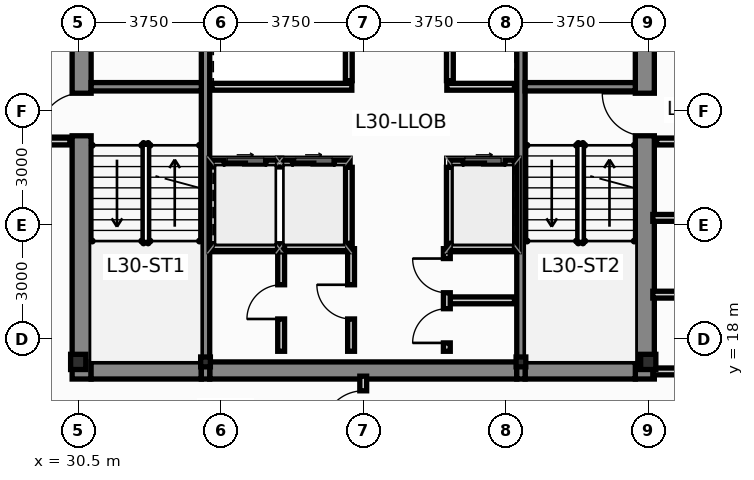
"""IFC4 building model, lengths in metres.
Left out: names, types, materials, properties, quantities, classifications, styles, units other than length and angle.
Written with IfcOpenShell. Run it as: python <this file> out.ifc"""

import sys

from ifc_helpers import new_model, si_unit, direction, frame, frame_2d, origin, origin_2d, place, context, subcontext, project, spatial, rectangle, i_section, extrude, source, transform, mapped, element, fill, save


model = new_model("IFC4")
c1 = context("Model", 3, precision=1e-05, world=origin(), true_north=direction((0.0, 1.0)))
c2 = subcontext(c1, "Body", "Model", "MODEL_VIEW")
j1 = project(units=[si_unit("LENGTHUNIT", "METRE"), si_unit("PLANEANGLEUNIT", "RADIAN")], contexts=[c1])
p1 = place(None, origin())
s1 = spatial("IfcSite", under=j1, at=p1, CompositionType="ELEMENT")
p2 = place(p1, origin())
s2 = spatial("IfcBuilding", under=s1, at=p2, CompositionType="ELEMENT")
p3 = place(p2, frame((0.0, 0.0, 116.35)))
s3 = spatial("IfcBuildingStorey", under=s2, at=p3, CompositionType="ELEMENT", Elevation=116.35)
m1 = source(origin(), c2, "Body", "SweptSolid", [
    extrude(i_section(OverallWidth=0.4, OverallDepth=0.4, WebThickness=0.02, FlangeThickness=0.032, at=origin_2d()), origin(), (0.0, 0.0, 1.0), 3.65),
])
for number, where, z_axis, x_axis in (
    (1, (30.5, 17.4, 0.0), (0.0, 0.0, 1.0), (1.0, 0.0, 0.0)),
    (2, (45.5, 17.4, 0.0), (0.0, 0.0, 1.0), (1.0, 0.0, 0.0)),
):
    element("IfcColumn", number, at=place(p3, frame(where, z_axis=z_axis, x_axis=x_axis)), inside=s3, PredefinedType="COLUMN", context=c2, shape_type="MappedRepresentation", body=[
        mapped(m1, transform((0.0, 0.0, 0.0), scale=1.0)),
    ])
m2 = source(origin(), c2, "Body", "SweptSolid", [
    extrude(i_section(OverallWidth=0.256, OverallDepth=0.26, WebThickness=0.01, FlangeThickness=0.017, at=origin_2d()), origin(), (0.0, 0.0, 1.0), 3.65),
])
for number, where, z_axis, x_axis in (
    (3, (33.85, 17.4, 0.0), (0.0, 0.0, 1.0), (1.0, 0.0, 0.0)),
    (4, (42.15, 17.4, 0.0), (0.0, 0.0, 1.0), (1.0, 0.0, 0.0)),
):
    element("IfcColumn", number, at=place(p3, frame(where, z_axis=z_axis, x_axis=x_axis)), inside=s3, PredefinedType="COLUMN", context=c2, shape_type="MappedRepresentation", body=[
        mapped(m2, transform((0.0, 0.0, 0.0), scale=1.0)),
    ])
p4 = place(p3, frame((30.59, 16.95, 0.0), z_axis=(0.0, 0.0, 1.0), x_axis=(0.0, 1.0, 0.0)))
e5 = element("IfcWall", 5, at=p4, inside=s3, PredefinedType="SHEAR", context=c2, shape_type="SweptSolid", body=[
    extrude(rectangle(XDim=13.275, YDim=0.5, at=frame_2d((6.638, 0.0))), origin(), (0.0, 0.0, 1.0), 3.65),
])
p5 = place(p4, frame((6.4, 0.0, 0.0)))
e6 = element("IfcOpeningElement", 6, at=p5, cuts=e5, PredefinedType="OPENING", context=c2, shape_type="SweptSolid", body=[
    extrude(rectangle(XDim=1.12, YDim=2.15, at=frame_2d((0.56, 1.075))), frame((0.0, 0.262, 0.0), z_axis=(0.0, -1.0, 0.0), x_axis=(1.0, 0.0, 0.0)), (0.0, 0.0, 1.0), 0.524),
])
p6 = place(p4, frame((10.85, 0.0, 0.0)))
e7 = element("IfcOpeningElement", 7, at=p6, cuts=e5, PredefinedType="OPENING", context=c2, shape_type="SweptSolid", body=[
    extrude(rectangle(XDim=1.2, YDim=2.2, at=frame_2d((0.6, 1.1))), frame((0.0, 0.262, 0.0), z_axis=(0.0, -1.0, 0.0), x_axis=(1.0, 0.0, 0.0)), (0.0, 0.0, 1.0), 0.524),
])
p7 = place(p3, frame((45.41, 16.95, 0.0), z_axis=(0.0, 0.0, 1.0), x_axis=(0.0, 1.0, 0.0)))
e8 = element("IfcWall", 8, at=p7, inside=s3, PredefinedType="SHEAR", context=c2, shape_type="SweptSolid", body=[
    extrude(rectangle(XDim=13.275, YDim=0.5, at=frame_2d((6.638, 0.0))), origin(), (0.0, 0.0, 1.0), 3.65),
])
p8 = place(p7, frame((6.4, 0.0, 0.0)))
e9 = element("IfcOpeningElement", 9, at=p8, cuts=e8, PredefinedType="OPENING", context=c2, shape_type="SweptSolid", body=[
    extrude(rectangle(XDim=1.12, YDim=2.15, at=frame_2d((0.56, 1.075))), frame((0.0, 0.262, 0.0), z_axis=(0.0, -1.0, 0.0), x_axis=(1.0, 0.0, 0.0)), (0.0, 0.0, 1.0), 0.524),
])
p9 = place(p7, frame((10.85, 0.0, 0.0)))
e10 = element("IfcOpeningElement", 10, at=p9, cuts=e8, PredefinedType="OPENING", context=c2, shape_type="SweptSolid", body=[
    extrude(rectangle(XDim=1.2, YDim=2.2, at=frame_2d((0.6, 1.1))), frame((0.0, 0.262, 0.0), z_axis=(0.0, -1.0, 0.0), x_axis=(1.0, 0.0, 0.0)), (0.0, 0.0, 1.0), 0.524),
])
p10 = place(p3, frame((30.84, 17.175, 0.0), z_axis=(0.0, 0.0, 1.0), x_axis=(1.0, 0.0, 0.0)))
e11 = element("IfcWall", 11, at=p10, inside=s3, PredefinedType="SHEAR", context=c2, shape_type="SweptSolid", body=[
    extrude(rectangle(XDim=2.9, YDim=0.45, at=frame_2d((1.45, 0.0))), origin(), (0.0, 0.0, 1.0), 3.65),
])
p11 = place(p3, frame((33.96, 17.175, 0.0), z_axis=(0.0, 0.0, 1.0), x_axis=(1.0, 0.0, 0.0)))
e12 = element("IfcWall", 12, at=p11, inside=s3, PredefinedType="SHEAR", context=c2, shape_type="SweptSolid", body=[
    extrude(rectangle(XDim=8.08, YDim=0.45, at=frame_2d((4.04, 0.0))), origin(), (0.0, 0.0, 1.0), 3.65),
])
p12 = place(p3, frame((42.26, 17.175, 0.0), z_axis=(0.0, 0.0, 1.0), x_axis=(1.0, 0.0, 0.0)))
e13 = element("IfcWall", 13, at=p12, inside=s3, PredefinedType="SHEAR", context=c2, shape_type="SweptSolid", body=[
    extrude(rectangle(XDim=2.9, YDim=0.45, at=frame_2d((1.45, 0.0))), origin(), (0.0, 0.0, 1.0), 3.65),
])
for number, where, z_axis, x_axis in (
    (14, (33.85, 16.95, 0.0), (0.0, 0.0, 1.0), (0.0, 1.0, 0.0)),
    (15, (42.15, 16.95, 0.0), (0.0, 0.0, 1.0), (0.0, 1.0, 0.0)),
):
    element("IfcWall", number, at=place(p3, frame(where, z_axis=z_axis, x_axis=x_axis)), inside=s3, PredefinedType="SHEAR", context=c2, shape_type="SweptSolid", body=[
        extrude(rectangle(XDim=13.275, YDim=0.22, at=frame_2d((6.638, 0.0))), origin(), (0.0, 0.0, 1.0), 3.65),
    ])
for number, where, z_axis, x_axis in (
    (16, (30.84, 24.64, 0.0), (0.0, 0.0, 1.0), (1.0, 0.0, 0.0)),
    (17, (42.26, 24.64, 0.0), (0.0, 0.0, 1.0), (1.0, 0.0, 0.0)),
):
    element("IfcWall", number, at=place(p3, frame(where, z_axis=z_axis, x_axis=x_axis)), inside=s3, PredefinedType="SHEAR", context=c2, shape_type="SweptSolid", body=[
        extrude(rectangle(XDim=2.9, YDim=0.22, at=frame_2d((1.45, 0.0))), origin(), (0.0, 0.0, 1.0), 3.65),
    ])
p13 = place(p3, frame((34.02, 22.62, 0.0), z_axis=(0.0, 0.0, 1.0), x_axis=(1.0, 0.0, 0.0)))
e18 = element("IfcWall", 18, at=p13, inside=s3, PredefinedType="PARTITIONING", context=c2, shape_type="SweptSolid", body=[
    extrude(rectangle(XDim=3.6, YDim=0.18, at=frame_2d((1.8, 0.0))), origin(), (0.0, 0.0, 1.0), 3.4),
])
p14 = place(p13, frame((0.32, 0.0, 0.0)))
e19 = element("IfcOpeningElement", 19, at=p14, cuts=e18, PredefinedType="OPENING", context=c2, shape_type="SweptSolid", body=[
    extrude(rectangle(XDim=1.1, YDim=2.2, at=frame_2d((0.55, 1.1))), frame((0.0, 0.102, 0.0), z_axis=(0.0, -1.0, 0.0), x_axis=(1.0, 0.0, 0.0)), (0.0, 0.0, 1.0), 0.204),
])
p15 = place(p13, frame((2.12, 0.0, 0.0)))
e20 = element("IfcOpeningElement", 20, at=p15, cuts=e18, PredefinedType="OPENING", context=c2, shape_type="SweptSolid", body=[
    extrude(rectangle(XDim=1.1, YDim=2.2, at=frame_2d((0.55, 1.1))), frame((0.0, 0.102, 0.0), z_axis=(0.0, -1.0, 0.0), x_axis=(1.0, 0.0, 0.0)), (0.0, 0.0, 1.0), 0.204),
])
p16 = place(p3, frame((40.28, 22.62, 0.0), z_axis=(0.0, 0.0, 1.0), x_axis=(1.0, 0.0, 0.0)))
e21 = element("IfcWall", 21, at=p16, inside=s3, PredefinedType="PARTITIONING", context=c2, shape_type="SweptSolid", body=[
    extrude(rectangle(XDim=1.7, YDim=0.18, at=frame_2d((0.85, 0.0))), origin(), (0.0, 0.0, 1.0), 3.4),
])
p17 = place(p16, frame((0.35, 0.0, 0.0)))
e22 = element("IfcOpeningElement", 22, at=p17, cuts=e21, PredefinedType="OPENING", context=c2, shape_type="SweptSolid", body=[
    extrude(rectangle(XDim=1.1, YDim=2.2, at=frame_2d((0.55, 1.1))), frame((0.0, 0.102, 0.0), z_axis=(0.0, -1.0, 0.0), x_axis=(1.0, 0.0, 0.0)), (0.0, 0.0, 1.0), 0.204),
])
for number, where, z_axis, x_axis in (
    (23, (37.62, 20.52, 0.0), (0.0, 0.0, 1.0), (0.0, 1.0, 0.0)),
    (24, (40.28, 20.52, 0.0), (0.0, 0.0, 1.0), (0.0, 1.0, 0.0)),
    (25, (37.62, 24.8, 0.0), (0.0, 0.0, 1.0), (0.0, 1.0, 0.0)),
    (26, (40.28, 24.8, 0.0), (0.0, 0.0, 1.0), (0.0, 1.0, 0.0)),
):
    element("IfcWall", number, at=place(p3, frame(where, z_axis=z_axis, x_axis=x_axis)), inside=s3, PredefinedType="PARTITIONING", context=c2, shape_type="SweptSolid", body=[
        extrude(rectangle(XDim=2.0, YDim=0.18, at=frame_2d((1.0, 0.0))), origin(), (0.0, 0.0, 1.0), 3.4),
    ])
p18 = place(p3, frame((34.02, 24.64, 0.0), z_axis=(0.0, 0.0, 1.0), x_axis=(1.0, 0.0, 0.0)))
e27 = element("IfcWall", 27, at=p18, inside=s3, PredefinedType="PARTITIONING", context=c2, shape_type="SweptSolid", body=[
    extrude(rectangle(XDim=3.68, YDim=0.18, at=frame_2d((1.84, 0.0))), origin(), (0.0, 0.0, 1.0), 3.4),
])
p19 = place(p3, frame((40.2, 24.64, 0.0), z_axis=(0.0, 0.0, 1.0), x_axis=(1.0, 0.0, 0.0)))
e28 = element("IfcWall", 28, at=p19, inside=s3, PredefinedType="PARTITIONING", context=c2, shape_type="SweptSolid", body=[
    extrude(rectangle(XDim=1.78, YDim=0.18, at=frame_2d((0.89, 0.0))), origin(), (0.0, 0.0, 1.0), 3.4),
])
for number, where, z_axis, x_axis in (
    (29, (27.52, 23.2, 0.0), (0.0, 0.0, 1.0), (1.0, 0.0, 0.0)),
    (30, (45.72, 23.2, 0.0), (0.0, 0.0, 1.0), (1.0, 0.0, 0.0)),
):
    element("IfcWall", number, at=place(p3, frame(where, z_axis=z_axis, x_axis=x_axis)), inside=s3, PredefinedType="PARTITIONING", context=c2, shape_type="SweptSolid", body=[
        extrude(rectangle(XDim=2.76, YDim=0.18, at=frame_2d((1.38, 0.0))), origin(), (0.0, 0.0, 1.0), 3.4),
    ])
p20 = place(p3, frame((34.02, 20.42, 0.0), z_axis=(0.0, 0.0, 1.0), x_axis=(1.0, 0.0, 0.0)))
e31 = element("IfcWall", 31, at=p20, inside=s3, PredefinedType="PARTITIONING", context=c2, shape_type="SweptSolid", body=[
    extrude(rectangle(XDim=3.64, YDim=0.18, at=frame_2d((1.82, 0.0))), origin(), (0.0, 0.0, 1.0), 3.4),
])
p21 = place(p3, frame((40.22, 20.42, 0.0), z_axis=(0.0, 0.0, 1.0), x_axis=(1.0, 0.0, 0.0)))
e32 = element("IfcWall", 32, at=p21, inside=s3, PredefinedType="PARTITIONING", context=c2, shape_type="SweptSolid", body=[
    extrude(rectangle(XDim=1.76, YDim=0.18, at=frame_2d((0.88, 0.0))), origin(), (0.0, 0.0, 1.0), 3.4),
])
p22 = place(p3, frame((35.84, 17.68, 0.0), z_axis=(0.0, 0.0, 1.0), x_axis=(0.0, 1.0, 0.0)))
e33 = element("IfcWall", 33, at=p22, inside=s3, PredefinedType="PARTITIONING", context=c2, shape_type="SweptSolid", body=[
    extrude(rectangle(XDim=2.7, YDim=0.18, at=frame_2d((1.35, 0.0))), origin(), (0.0, 0.0, 1.0), 3.4),
])
p23 = place(p22, frame((0.85, 0.0, 0.0)))
e34 = element("IfcOpeningElement", 34, at=p23, cuts=e33, PredefinedType="OPENING", context=c2, shape_type="SweptSolid", body=[
    extrude(rectangle(XDim=0.9, YDim=2.1, at=frame_2d((0.45, 1.05))), frame((0.0, 0.102, 0.0), z_axis=(0.0, -1.0, 0.0), x_axis=(1.0, 0.0, 0.0)), (0.0, 0.0, 1.0), 0.204),
])
p24 = place(p3, frame((37.68, 17.68, 0.0), z_axis=(0.0, 0.0, 1.0), x_axis=(0.0, 1.0, 0.0)))
e35 = element("IfcWall", 35, at=p24, inside=s3, PredefinedType="PARTITIONING", context=c2, shape_type="SweptSolid", body=[
    extrude(rectangle(XDim=2.7, YDim=0.18, at=frame_2d((1.35, 0.0))), origin(), (0.0, 0.0, 1.0), 3.4),
])
p25 = place(p24, frame((0.85, 0.0, 0.0)))
e36 = element("IfcOpeningElement", 36, at=p25, cuts=e35, PredefinedType="OPENING", context=c2, shape_type="SweptSolid", body=[
    extrude(rectangle(XDim=0.9, YDim=2.1, at=frame_2d((0.45, 1.05))), frame((0.0, 0.102, 0.0), z_axis=(0.0, -1.0, 0.0), x_axis=(1.0, 0.0, 0.0)), (0.0, 0.0, 1.0), 0.204),
])
p26 = place(p3, frame((40.28, 19.02, 0.0), z_axis=(0.0, 0.0, 1.0), x_axis=(1.0, 0.0, 0.0)))
e37 = element("IfcWall", 37, at=p26, inside=s3, PredefinedType="PARTITIONING", context=c2, shape_type="SweptSolid", body=[
    extrude(rectangle(XDim=1.7, YDim=0.18, at=frame_2d((0.85, 0.0))), origin(), (0.0, 0.0, 1.0), 3.4),
])
p27 = place(p3, frame((40.2, 17.68, 0.0), z_axis=(0.0, 0.0, 1.0), x_axis=(0.0, 1.0, 0.0)))
e38 = element("IfcWall", 38, at=p27, inside=s3, PredefinedType="PARTITIONING", context=c2, shape_type="SweptSolid", body=[
    extrude(rectangle(XDim=2.7, YDim=0.18, at=frame_2d((1.35, 0.0))), origin(), (0.0, 0.0, 1.0), 3.4),
])
p28 = place(p27, frame((0.22, 0.0, 0.0)))
e39 = element("IfcOpeningElement", 39, at=p28, cuts=e38, PredefinedType="OPENING", context=c2, shape_type="SweptSolid", body=[
    extrude(rectangle(XDim=0.9, YDim=2.1, at=frame_2d((0.45, 1.05))), frame((0.0, 0.102, 0.0), z_axis=(0.0, -1.0, 0.0), x_axis=(1.0, 0.0, 0.0)), (0.0, 0.0, 1.0), 0.204),
])
p29 = place(p27, frame((1.54, 0.0, 0.0)))
e40 = element("IfcOpeningElement", 40, at=p29, cuts=e38, PredefinedType="OPENING", context=c2, shape_type="SweptSolid", body=[
    extrude(rectangle(XDim=0.9, YDim=2.1, at=frame_2d((0.45, 1.05))), frame((0.0, 0.102, 0.0), z_axis=(0.0, -1.0, 0.0), x_axis=(1.0, 0.0, 0.0)), (0.0, 0.0, 1.0), 0.204),
])
for number, where, z_axis, x_axis in (
    (41, (45.62, 19.17, 0.0), (0.0, 0.0, 1.0), (1.0, 0.0, 0.0)),
    (42, (45.62, 21.19, 0.0), (0.0, 0.0, 1.0), (1.0, 0.0, 0.0)),
):
    element("IfcWall", number, at=place(p3, frame(where, z_axis=z_axis, x_axis=x_axis)), inside=s3, PredefinedType="PARTITIONING", context=c2, shape_type="SweptSolid", body=[
        extrude(rectangle(XDim=2.9, YDim=0.18, at=frame_2d((1.45, 0.0))), origin(), (0.0, 0.0, 1.0), 3.4),
    ])
p30 = place(p3, frame((45.62, 17.15, 0.0), z_axis=(0.0, 0.0, 1.0), x_axis=(1.0, 0.0, 0.0)))
e43 = element("IfcWall", 43, at=p30, inside=s3, PredefinedType="PARTITIONING", context=c2, shape_type="SweptSolid", body=[
    extrude(rectangle(XDim=2.9, YDim=0.18, at=frame_2d((1.45, 0.0))), origin(), (0.0, 0.0, 1.0), 2.783),
])
p31 = place(p3, frame((38.0, 15.205, 0.0), z_axis=(0.0, 0.0, 1.0), x_axis=(0.0, 1.0, 0.0)))
e44 = element("IfcWall", 44, at=p31, inside=s3, PredefinedType="PARTITIONING", context=c2, shape_type="SweptSolid", body=[
    extrude(rectangle(XDim=1.82, YDim=0.18, at=frame_2d((0.91, 0.0))), origin(), (0.0, 0.0, 1.0), 3.4),
])
p32 = place(p31, frame((0.385, 0.0, 0.0)))
e45 = element("IfcOpeningElement", 45, at=p32, cuts=e44, PredefinedType="OPENING", context=c2, shape_type="SweptSolid", body=[
    extrude(rectangle(XDim=1.05, YDim=2.15, at=frame_2d((0.525, 1.075))), frame((0.0, 0.102, 0.0), z_axis=(0.0, -1.0, 0.0), x_axis=(1.0, 0.0, 0.0)), (0.0, 0.0, 1.0), 0.204),
])
p33 = place(p5, origin())
e46 = element("IfcDoor", 46, at=p33, inside=s3, OperationType="SINGLE_SWING_LEFT", PredefinedType="DOOR", context=c2, shape_type="SweptSolid", body=[
    extrude(rectangle(XDim=1.12, YDim=2.15, at=frame_2d((0.56, 1.075))), frame((0.0, 0.025, 0.0), z_axis=(0.0, -1.0, 0.0), x_axis=(1.0, 0.0, 0.0)), (0.0, 0.0, 1.0), 0.05),
])
fill(e6, e46)
p34 = place(p8, origin())
e47 = element("IfcDoor", 47, at=p34, inside=s3, OperationType="SINGLE_SWING_RIGHT", PredefinedType="DOOR", context=c2, shape_type="SweptSolid", body=[
    extrude(rectangle(XDim=1.12, YDim=2.15, at=frame_2d((0.56, 1.075))), frame((0.0, 0.025, 0.0), z_axis=(0.0, -1.0, 0.0), x_axis=(1.0, 0.0, 0.0)), (0.0, 0.0, 1.0), 0.05),
])
fill(e9, e47)
p35 = place(p14, origin())
e48 = element("IfcDoor", 48, at=p35, inside=s3, OperationType="SLIDING_TO_LEFT", PredefinedType="DOOR", context=c2, shape_type="SweptSolid", body=[
    extrude(rectangle(XDim=1.1, YDim=2.2, at=frame_2d((0.55, 1.1))), frame((0.0, 0.025, 0.0), z_axis=(0.0, -1.0, 0.0), x_axis=(1.0, 0.0, 0.0)), (0.0, 0.0, 1.0), 0.05),
])
fill(e19, e48)
p36 = place(p15, origin())
e49 = element("IfcDoor", 49, at=p36, inside=s3, OperationType="SLIDING_TO_RIGHT", PredefinedType="DOOR", context=c2, shape_type="SweptSolid", body=[
    extrude(rectangle(XDim=1.1, YDim=2.2, at=frame_2d((0.55, 1.1))), frame((0.0, 0.025, 0.0), z_axis=(0.0, -1.0, 0.0), x_axis=(1.0, 0.0, 0.0)), (0.0, 0.0, 1.0), 0.05),
])
fill(e20, e49)
p37 = place(p17, origin())
e50 = element("IfcDoor", 50, at=p37, inside=s3, OperationType="SLIDING_TO_LEFT", PredefinedType="DOOR", context=c2, shape_type="SweptSolid", body=[
    extrude(rectangle(XDim=1.1, YDim=2.2, at=frame_2d((0.55, 1.1))), frame((0.0, 0.025, 0.0), z_axis=(0.0, -1.0, 0.0), x_axis=(1.0, 0.0, 0.0)), (0.0, 0.0, 1.0), 0.05),
])
fill(e22, e50)
p38 = place(p23, origin())
e51 = element("IfcDoor", 51, at=p38, inside=s3, OperationType="SINGLE_SWING_LEFT", PredefinedType="DOOR", context=c2, shape_type="SweptSolid", body=[
    extrude(rectangle(XDim=0.9, YDim=2.1, at=frame_2d((0.45, 1.05))), frame((0.0, 0.025, 0.0), z_axis=(0.0, -1.0, 0.0), x_axis=(1.0, 0.0, 0.0)), (0.0, 0.0, 1.0), 0.05),
])
fill(e34, e51)
p39 = place(p25, origin())
e52 = element("IfcDoor", 52, at=p39, inside=s3, OperationType="SINGLE_SWING_RIGHT", PredefinedType="DOOR", context=c2, shape_type="SweptSolid", body=[
    extrude(rectangle(XDim=0.9, YDim=2.1, at=frame_2d((0.45, 1.05))), frame((0.0, 0.025, 0.0), z_axis=(0.0, -1.0, 0.0), x_axis=(1.0, 0.0, 0.0)), (0.0, 0.0, 1.0), 0.05),
])
fill(e36, e52)
p40 = place(p28, origin())
e53 = element("IfcDoor", 53, at=p40, inside=s3, OperationType="SINGLE_SWING_LEFT", PredefinedType="DOOR", context=c2, shape_type="SweptSolid", body=[
    extrude(rectangle(XDim=0.9, YDim=2.1, at=frame_2d((0.45, 1.05))), frame((0.0, 0.025, 0.0), z_axis=(0.0, -1.0, 0.0), x_axis=(1.0, 0.0, 0.0)), (0.0, 0.0, 1.0), 0.05),
])
fill(e39, e53)
p41 = place(p29, origin())
e54 = element("IfcDoor", 54, at=p41, inside=s3, OperationType="SINGLE_SWING_RIGHT", PredefinedType="DOOR", context=c2, shape_type="SweptSolid", body=[
    extrude(rectangle(XDim=0.9, YDim=2.1, at=frame_2d((0.45, 1.05))), frame((0.0, 0.025, 0.0), z_axis=(0.0, -1.0, 0.0), x_axis=(1.0, 0.0, 0.0)), (0.0, 0.0, 1.0), 0.05),
])
fill(e40, e54)
p42 = place(p32, origin())
e55 = element("IfcDoor", 55, at=p42, inside=s3, OperationType="SINGLE_SWING_LEFT", PredefinedType="DOOR", context=c2, shape_type="SweptSolid", body=[
    extrude(rectangle(XDim=1.05, YDim=2.15, at=frame_2d((0.525, 1.075))), frame((0.0, 0.025, 0.0), z_axis=(0.0, -1.0, 0.0), x_axis=(1.0, 0.0, 0.0)), (0.0, 0.0, 1.0), 0.05),
])
fill(e45, e55)
save(model, sys.argv[1])
